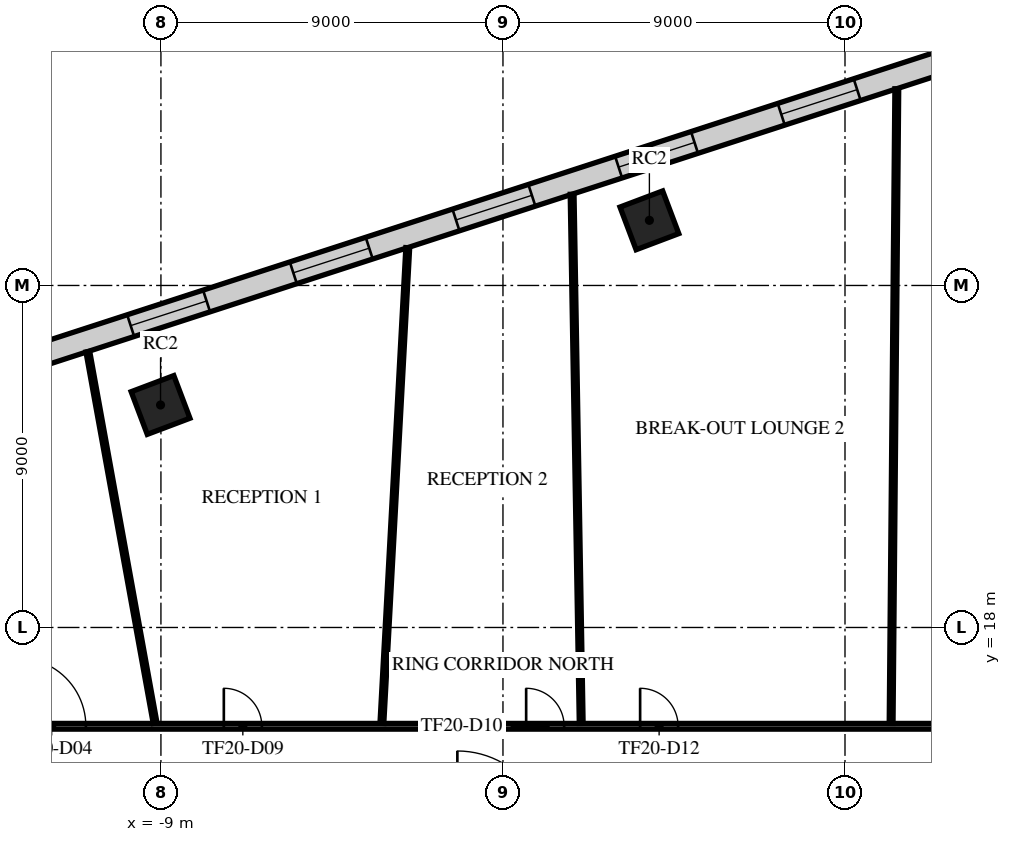
"""IFC4 building model, lengths in metres.
Left out: names, types, materials, properties, quantities, classifications, styles, units other than length and angle.
Written with IfcOpenShell. Run it as: python <this file> out.ifc"""

import sys

from ifc_helpers import new_model, si_unit, direction, frame, frame_2d, origin, origin_2d, place, context, subcontext, project, spatial, rectangle, extrude, element, fill, save


model = new_model("IFC4")
c1 = context("Model", 3, precision=1e-05, world=origin(), true_north=direction((0.0, 1.0)))
c2 = subcontext(c1, "Body", "Model", "MODEL_VIEW")
j1 = project(units=[si_unit("LENGTHUNIT", "METRE"), si_unit("PLANEANGLEUNIT", "RADIAN")], contexts=[c1])
p1 = place(None, origin())
s1 = spatial("IfcSite", under=j1, at=p1, CompositionType="ELEMENT")
p2 = place(p1, origin())
s2 = spatial("IfcBuilding", under=s1, at=p2, CompositionType="ELEMENT")
p3 = place(p2, frame((0.0, 0.0, 90.1)))
s3 = spatial("IfcBuildingStorey", under=s2, at=p3, CompositionType="ELEMENT", Elevation=90.1)
for number, where, z_axis, x_axis in (
    (1, (3.853, 28.714, 0.0), (0.0, 0.0, 1.0), (0.935, 0.353, 0.0)),
    (2, (-9.01, 23.855, 0.0), (0.0, 0.0, 1.0), (0.935, 0.353, 0.0)),
):
    element("IfcColumn", number, at=place(p3, frame(where, z_axis=z_axis, x_axis=x_axis)), inside=s3, PredefinedType="COLUMN", context=c2, shape_type="SweptSolid", body=[
        extrude(rectangle(XDim=1.2, YDim=1.2, at=origin_2d()), origin(), (0.0, 0.0, 1.0), 4.0),
    ])
p4 = place(p3, frame((14.741, 33.915, 0.0), z_axis=(0.0, 0.0, 1.0), x_axis=(-0.951056049788, -0.309018430131, 0.0)))
e3 = element("IfcWall", 3, at=p4, inside=s3, PredefinedType="STANDARD", context=c2, shape_type="SweptSolid", body=[
    extrude(rectangle(XDim=49.376, YDim=0.6, at=frame_2d((24.688, 0.0))), origin(), (0.0, 0.0, 1.0), 3.58),
])
p5 = place(p4, frame((1.2, 0.0, 0.9)))
e4 = element("IfcOpeningElement", 4, at=p5, cuts=e3, PredefinedType="OPENING", context=c2, shape_type="SweptSolid", body=[
    extrude(rectangle(XDim=2.1, YDim=2.1, at=frame_2d((1.05, 1.05))), frame((0.0, 0.31, 0.0), z_axis=(0.0, -1.0, 0.0), x_axis=(1.0, 0.0, 0.0)), (0.0, 0.0, 1.0), 0.62),
])
p6 = place(p4, frame((5.7, 0.0, 0.9)))
e5 = element("IfcOpeningElement", 5, at=p6, cuts=e3, PredefinedType="OPENING", context=c2, shape_type="SweptSolid", body=[
    extrude(rectangle(XDim=2.1, YDim=2.1, at=frame_2d((1.05, 1.05))), frame((0.0, 0.31, 0.0), z_axis=(0.0, -1.0, 0.0), x_axis=(1.0, 0.0, 0.0)), (0.0, 0.0, 1.0), 0.62),
])
p7 = place(p4, frame((10.2, 0.0, 0.9)))
e6 = element("IfcOpeningElement", 6, at=p7, cuts=e3, PredefinedType="OPENING", context=c2, shape_type="SweptSolid", body=[
    extrude(rectangle(XDim=2.1, YDim=2.1, at=frame_2d((1.05, 1.05))), frame((0.0, 0.31, 0.0), z_axis=(0.0, -1.0, 0.0), x_axis=(1.0, 0.0, 0.0)), (0.0, 0.0, 1.0), 0.62),
])
p8 = place(p4, frame((14.7, 0.0, 0.9)))
e7 = element("IfcOpeningElement", 7, at=p8, cuts=e3, PredefinedType="OPENING", context=c2, shape_type="SweptSolid", body=[
    extrude(rectangle(XDim=2.1, YDim=2.1, at=frame_2d((1.05, 1.05))), frame((0.0, 0.31, 0.0), z_axis=(0.0, -1.0, 0.0), x_axis=(1.0, 0.0, 0.0)), (0.0, 0.0, 1.0), 0.62),
])
p9 = place(p4, frame((19.2, 0.0, 0.9)))
e8 = element("IfcOpeningElement", 8, at=p9, cuts=e3, PredefinedType="OPENING", context=c2, shape_type="SweptSolid", body=[
    extrude(rectangle(XDim=2.1, YDim=2.1, at=frame_2d((1.05, 1.05))), frame((0.0, 0.31, 0.0), z_axis=(0.0, -1.0, 0.0), x_axis=(1.0, 0.0, 0.0)), (0.0, 0.0, 1.0), 0.62),
])
p10 = place(p4, frame((23.7, 0.0, 0.9)))
e9 = element("IfcOpeningElement", 9, at=p10, cuts=e3, PredefinedType="OPENING", context=c2, shape_type="SweptSolid", body=[
    extrude(rectangle(XDim=2.1, YDim=2.1, at=frame_2d((1.05, 1.05))), frame((0.0, 0.31, 0.0), z_axis=(0.0, -1.0, 0.0), x_axis=(1.0, 0.0, 0.0)), (0.0, 0.0, 1.0), 0.62),
])
p11 = place(p4, frame((28.2, 0.0, 0.9)))
e10 = element("IfcOpeningElement", 10, at=p11, cuts=e3, PredefinedType="OPENING", context=c2, shape_type="SweptSolid", body=[
    extrude(rectangle(XDim=2.1, YDim=2.1, at=frame_2d((1.05, 1.05))), frame((0.0, 0.31, 0.0), z_axis=(0.0, -1.0, 0.0), x_axis=(1.0, 0.0, 0.0)), (0.0, 0.0, 1.0), 0.62),
])
p12 = place(p4, frame((32.7, 0.0, 0.9)))
e11 = element("IfcOpeningElement", 11, at=p12, cuts=e3, PredefinedType="OPENING", context=c2, shape_type="SweptSolid", body=[
    extrude(rectangle(XDim=2.1, YDim=2.1, at=frame_2d((1.05, 1.05))), frame((0.0, 0.31, 0.0), z_axis=(0.0, -1.0, 0.0), x_axis=(1.0, 0.0, 0.0)), (0.0, 0.0, 1.0), 0.62),
])
p13 = place(p4, frame((37.2, 0.0, 0.9)))
e12 = element("IfcOpeningElement", 12, at=p13, cuts=e3, PredefinedType="OPENING", context=c2, shape_type="SweptSolid", body=[
    extrude(rectangle(XDim=2.1, YDim=2.1, at=frame_2d((1.05, 1.05))), frame((0.0, 0.31, 0.0), z_axis=(0.0, -1.0, 0.0), x_axis=(1.0, 0.0, 0.0)), (0.0, 0.0, 1.0), 0.62),
])
p14 = place(p4, frame((41.7, 0.0, 0.9)))
e13 = element("IfcOpeningElement", 13, at=p14, cuts=e3, PredefinedType="OPENING", context=c2, shape_type="SweptSolid", body=[
    extrude(rectangle(XDim=2.1, YDim=2.1, at=frame_2d((1.05, 1.05))), frame((0.0, 0.31, 0.0), z_axis=(0.0, -1.0, 0.0), x_axis=(1.0, 0.0, 0.0)), (0.0, 0.0, 1.0), 0.62),
])
p15 = place(p4, frame((46.138, 0.0, 0.9)))
e14 = element("IfcOpeningElement", 14, at=p15, cuts=e3, PredefinedType="OPENING", context=c2, shape_type="SweptSolid", body=[
    extrude(rectangle(XDim=2.1, YDim=2.1, at=frame_2d((1.05, 1.05))), frame((0.0, 0.31, 0.0), z_axis=(0.0, -1.0, 0.0), x_axis=(1.0, 0.0, 0.0)), (0.0, 0.0, 1.0), 0.62),
])
p16 = place(p3, frame((-15.325, 15.4, 0.0), z_axis=(0.0, 0.0, 1.0), x_axis=(1.0, 0.0, 0.0)))
e15 = element("IfcWall", 15, at=p16, inside=s3, PredefinedType="PARTITIONING", context=c2, shape_type="SweptSolid", body=[
    extrude(rectangle(XDim=30.725, YDim=0.15, at=frame_2d((15.362, 0.0))), origin(), (0.0, 0.0, 1.0), 3.08),
])
p17 = place(p16, frame((2.55, 0.0, 0.0)))
e16 = element("IfcOpeningElement", 16, at=p17, cuts=e15, PredefinedType="OPENING", context=c2, shape_type="SweptSolid", body=[
    extrude(rectangle(XDim=1.8, YDim=2.1, at=frame_2d((0.9, 1.05))), frame((0.0, 0.085, 0.0), z_axis=(0.0, -1.0, 0.0), x_axis=(1.0, 0.0, 0.0)), (0.0, 0.0, 1.0), 0.17),
])
p18 = place(p16, frame((7.98, 0.0, 0.0)))
e17 = element("IfcOpeningElement", 17, at=p18, cuts=e15, PredefinedType="OPENING", context=c2, shape_type="SweptSolid", body=[
    extrude(rectangle(XDim=1.0, YDim=2.1, at=frame_2d((0.5, 1.05))), frame((0.0, 0.085, 0.0), z_axis=(0.0, -1.0, 0.0), x_axis=(1.0, 0.0, 0.0)), (0.0, 0.0, 1.0), 0.17),
])
p19 = place(p16, frame((15.935, 0.0, 0.0)))
e18 = element("IfcOpeningElement", 18, at=p19, cuts=e15, PredefinedType="OPENING", context=c2, shape_type="SweptSolid", body=[
    extrude(rectangle(XDim=1.0, YDim=2.1, at=frame_2d((0.5, 1.05))), frame((0.0, 0.085, 0.0), z_axis=(0.0, -1.0, 0.0), x_axis=(1.0, 0.0, 0.0)), (0.0, 0.0, 1.0), 0.17),
])
p20 = place(p16, frame((18.934, 0.0, 0.0)))
e19 = element("IfcOpeningElement", 19, at=p20, cuts=e15, PredefinedType="OPENING", context=c2, shape_type="SweptSolid", body=[
    extrude(rectangle(XDim=1.0, YDim=2.1, at=frame_2d((0.5, 1.05))), frame((0.0, 0.085, 0.0), z_axis=(0.0, -1.0, 0.0), x_axis=(1.0, 0.0, 0.0)), (0.0, 0.0, 1.0), 0.17),
])
p21 = place(p16, frame((27.088, 0.0, 0.0)))
e20 = element("IfcOpeningElement", 20, at=p21, cuts=e15, PredefinedType="OPENING", context=c2, shape_type="SweptSolid", body=[
    extrude(rectangle(XDim=1.8, YDim=2.1, at=frame_2d((0.9, 1.05))), frame((0.0, 0.085, 0.0), z_axis=(0.0, -1.0, 0.0), x_axis=(1.0, 0.0, 0.0)), (0.0, 0.0, 1.0), 0.17),
])
p22 = place(p3, frame((-10.924, 25.259, 0.0), z_axis=(0.0, 0.0, 1.0), x_axis=(0.178208444623, -0.983992759254, 0.0)))
e21 = element("IfcWall", 21, at=p22, inside=s3, PredefinedType="PARTITIONING", context=c2, shape_type="SweptSolid", body=[
    extrude(rectangle(XDim=9.934, YDim=0.1, at=frame_2d((4.967, 0.0))), origin(), (0.0, 0.0, 1.0), 2.83),
])
p23 = place(p3, frame((-3.186, 15.478, 0.0), z_axis=(0.0, 0.0, 1.0), x_axis=(0.054322200438, 0.998523459183, 0.0)))
e22 = element("IfcWall", 22, at=p23, inside=s3, PredefinedType="PARTITIONING", context=c2, shape_type="SweptSolid", body=[
    extrude(rectangle(XDim=12.535, YDim=0.1, at=frame_2d((6.267, 0.0))), origin(), (0.0, 0.0, 1.0), 2.83),
])
p24 = place(p3, frame((1.82, 29.399, 0.0), z_axis=(0.0, 0.0, 1.0), x_axis=(0.01714604741, -0.999852995724, 0.0)))
e23 = element("IfcWall", 23, at=p24, inside=s3, PredefinedType="PARTITIONING", context=c2, shape_type="SweptSolid", body=[
    extrude(rectangle(XDim=13.926, YDim=0.1, at=frame_2d((6.963, 0.0))), origin(), (0.0, 0.0, 1.0), 2.83),
])
p25 = place(p3, frame((10.214, 15.475, 0.0), z_axis=(0.0, 0.0, 1.0), x_axis=(0.00896123542, 0.999959847324, 0.0)))
e24 = element("IfcWall", 24, at=p25, inside=s3, PredefinedType="PARTITIONING", context=c2, shape_type="SweptSolid", body=[
    extrude(rectangle(XDim=16.701, YDim=0.1, at=frame_2d((8.35, 0.0))), origin(), (0.0, 0.0, 1.0), 2.83),
])
p26 = place(p6, origin())
e25 = element("IfcWindow", 25, at=p26, inside=s3, PartitioningType="SINGLE_PANEL", PredefinedType="WINDOW", context=c2, shape_type="SweptSolid", body=[
    extrude(rectangle(XDim=2.1, YDim=2.1, at=frame_2d((1.05, 1.05))), frame((0.0, 0.03, 0.0), z_axis=(0.0, -1.0, 0.0), x_axis=(1.0, 0.0, 0.0)), (0.0, 0.0, 1.0), 0.06),
])
fill(e5, e25)
p27 = place(p7, origin())
e26 = element("IfcWindow", 26, at=p27, inside=s3, PartitioningType="SINGLE_PANEL", PredefinedType="WINDOW", context=c2, shape_type="SweptSolid", body=[
    extrude(rectangle(XDim=2.1, YDim=2.1, at=frame_2d((1.05, 1.05))), frame((0.0, 0.03, 0.0), z_axis=(0.0, -1.0, 0.0), x_axis=(1.0, 0.0, 0.0)), (0.0, 0.0, 1.0), 0.06),
])
fill(e6, e26)
p28 = place(p8, origin())
e27 = element("IfcWindow", 27, at=p28, inside=s3, PartitioningType="SINGLE_PANEL", PredefinedType="WINDOW", context=c2, shape_type="SweptSolid", body=[
    extrude(rectangle(XDim=2.1, YDim=2.1, at=frame_2d((1.05, 1.05))), frame((0.0, 0.03, 0.0), z_axis=(0.0, -1.0, 0.0), x_axis=(1.0, 0.0, 0.0)), (0.0, 0.0, 1.0), 0.06),
])
fill(e7, e27)
p29 = place(p9, origin())
e28 = element("IfcWindow", 28, at=p29, inside=s3, PartitioningType="SINGLE_PANEL", PredefinedType="WINDOW", context=c2, shape_type="SweptSolid", body=[
    extrude(rectangle(XDim=2.1, YDim=2.1, at=frame_2d((1.05, 1.05))), frame((0.0, 0.03, 0.0), z_axis=(0.0, -1.0, 0.0), x_axis=(1.0, 0.0, 0.0)), (0.0, 0.0, 1.0), 0.06),
])
fill(e8, e28)
p30 = place(p10, origin())
e29 = element("IfcWindow", 29, at=p30, inside=s3, PartitioningType="SINGLE_PANEL", PredefinedType="WINDOW", context=c2, shape_type="SweptSolid", body=[
    extrude(rectangle(XDim=2.1, YDim=2.1, at=frame_2d((1.05, 1.05))), frame((0.0, 0.03, 0.0), z_axis=(0.0, -1.0, 0.0), x_axis=(1.0, 0.0, 0.0)), (0.0, 0.0, 1.0), 0.06),
])
fill(e9, e29)
p31 = place(p17, origin())
e30 = element("IfcDoor", 30, at=p31, inside=s3, OperationType="DOUBLE_DOOR_SINGLE_SWING", PredefinedType="DOOR", context=c2, shape_type="SweptSolid", body=[
    extrude(rectangle(XDim=1.8, YDim=2.1, at=frame_2d((0.9, 1.05))), frame((0.0, 0.025, 0.0), z_axis=(0.0, -1.0, 0.0), x_axis=(1.0, 0.0, 0.0)), (0.0, 0.0, 1.0), 0.05),
])
fill(e16, e30)
p32 = place(p18, origin())
e31 = element("IfcDoor", 31, at=p32, inside=s3, OperationType="SINGLE_SWING_LEFT", PredefinedType="DOOR", context=c2, shape_type="SweptSolid", body=[
    extrude(rectangle(XDim=1.0, YDim=2.1, at=frame_2d((0.5, 1.05))), frame((0.0, 0.025, 0.0), z_axis=(0.0, -1.0, 0.0), x_axis=(1.0, 0.0, 0.0)), (0.0, 0.0, 1.0), 0.05),
])
fill(e17, e31)
p33 = place(p19, origin())
e32 = element("IfcDoor", 32, at=p33, inside=s3, OperationType="SINGLE_SWING_RIGHT", PredefinedType="DOOR", context=c2, shape_type="SweptSolid", body=[
    extrude(rectangle(XDim=1.0, YDim=2.1, at=frame_2d((0.5, 1.05))), frame((0.0, 0.025, 0.0), z_axis=(0.0, -1.0, 0.0), x_axis=(1.0, 0.0, 0.0)), (0.0, 0.0, 1.0), 0.05),
])
fill(e18, e32)
p34 = place(p20, origin())
e33 = element("IfcDoor", 33, at=p34, inside=s3, OperationType="SINGLE_SWING_LEFT", PredefinedType="DOOR", context=c2, shape_type="SweptSolid", body=[
    extrude(rectangle(XDim=1.0, YDim=2.1, at=frame_2d((0.5, 1.05))), frame((0.0, 0.025, 0.0), z_axis=(0.0, -1.0, 0.0), x_axis=(1.0, 0.0, 0.0)), (0.0, 0.0, 1.0), 0.05),
])
fill(e19, e33)
save(model, sys.argv[1])
